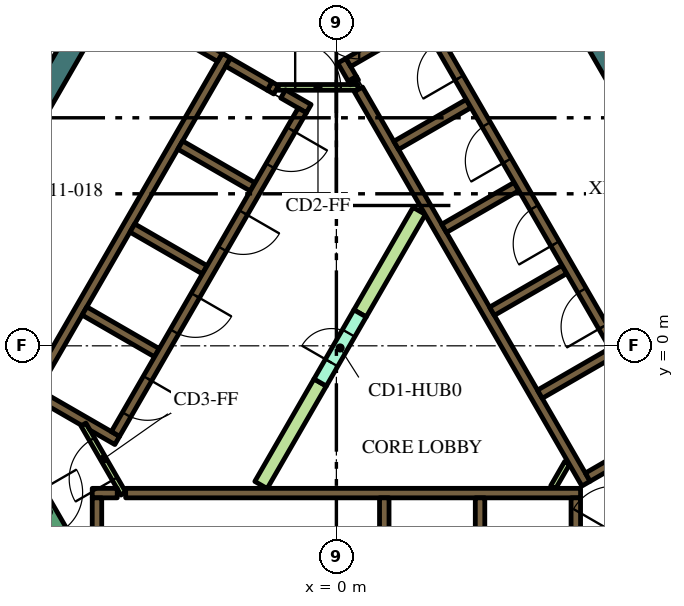
"""IFC4 building model, lengths in metres.
Left out: names, types, materials, properties, quantities, classifications, styles, units other than length and angle.
Written with IfcOpenShell. Run it as: python <this file> out.ifc"""

import sys

from ifc_helpers import new_model, si_unit, direction, frame, frame_2d, origin, place, context, subcontext, project, spatial, polyline, rectangle, outline, extrude, element, fill, save


model = new_model("IFC4")
c1 = context("Model", 3, precision=1e-05, world=origin(), true_north=direction((0.0, 1.0)))
c2 = subcontext(c1, "Body", "Model", "MODEL_VIEW")
j1 = project(units=[si_unit("LENGTHUNIT", "METRE"), si_unit("PLANEANGLEUNIT", "RADIAN")], contexts=[c1])
p1 = place(None, origin())
s1 = spatial("IfcSite", under=j1, at=p1, CompositionType="ELEMENT")
p2 = place(p1, origin())
s2 = spatial("IfcBuilding", under=s1, at=p2, CompositionType="ELEMENT")
p3 = place(p2, frame((0.0, 0.0, 267.0)))
s3 = spatial("IfcBuildingStorey", under=s2, at=p3, CompositionType="ELEMENT", Elevation=267.0)
p4 = place(p3, frame((5.928, 9.633, 0.0), z_axis=(0.0, 0.0, 1.0), x_axis=(0.499983823482, -0.8660347431, 0.0)))
e1 = element("IfcWall", 1, at=p4, inside=s3, PredefinedType="SOLIDWALL", context=c2, shape_type="SweptSolid", body=[
    extrude(rectangle(XDim=4.528, YDim=0.6, at=frame_2d((2.264, 0.0))), origin(), (0.0, 0.0, 1.0), 4.2),
])
p5 = place(p3, frame((-4.652, 11.842, 0.0), z_axis=(0.0, 0.0, 1.0), x_axis=(-0.500003640647, -0.866023301845, 0.0)))
e2 = element("IfcWall", 2, at=p5, inside=s3, PredefinedType="SOLIDWALL", context=c2, shape_type="SweptSolid", body=[
    extrude(rectangle(XDim=15.858, YDim=0.6, at=frame_2d((7.929, 0.0))), origin(), (0.0, 0.0, 1.0), 4.2),
])
p6 = place(p3, frame((-5.545, -3.875, 0.0), z_axis=(0.0, 0.0, 1.0), x_axis=(1.0, 0.0, 0.0)))
e3 = element("IfcWall", 3, at=p6, inside=s3, PredefinedType="SOLIDWALL", context=c2, shape_type="SweptSolid", body=[
    extrude(rectangle(XDim=11.97, YDim=0.25, at=frame_2d((5.985, 0.0))), origin(), (0.0, 0.0, 1.0), 4.2),
])
p7 = place(p3, frame((-6.425, -3.875, 0.0), z_axis=(0.0, 0.0, 1.0), x_axis=(1.0, 0.0, 0.0)))
e4 = element("IfcWall", 4, at=p7, inside=s3, PredefinedType="SOLIDWALL", context=c2, shape_type="SweptSolid", body=[
    extrude(rectangle(XDim=0.658, YDim=0.25, at=frame_2d((0.329, 0.0))), origin(), (0.0, 0.0, 1.0), 4.2),
])
p8 = place(p3, frame((6.3, -7.24, 0.0), z_axis=(0.0, 0.0, 1.0), x_axis=(0.0, 1.0, 0.0)))
e5 = element("IfcWall", 5, at=p8, inside=s3, PredefinedType="SOLIDWALL", context=c2, shape_type="SweptSolid", body=[
    extrude(rectangle(XDim=3.24, YDim=0.25, at=frame_2d((1.62, 0.0))), origin(), (0.0, 0.0, 1.0), 4.2),
])
for number, where, z_axis, x_axis in (
    (6, (3.78, -4.0, 0.0), (0.0, 0.0, 1.0), (0.0, -1.0, 0.0)),
    (7, (1.26, -4.0, 0.0), (0.0, 0.0, 1.0), (0.0, -1.0, 0.0)),
):
    element("IfcWall", number, at=place(p3, frame(where, z_axis=z_axis, x_axis=x_axis)), inside=s3, PredefinedType="SOLIDWALL", context=c2, shape_type="SweptSolid", body=[
        extrude(rectangle(XDim=2.2, YDim=0.25, at=frame_2d((1.1, 0.0))), origin(), (0.0, 0.0, 1.0), 4.2),
    ])
p9 = place(p3, frame((-6.3, -7.125, 0.0), z_axis=(0.0, 0.0, 1.0), x_axis=(0.0, 1.0, 0.0)))
e8 = element("IfcWall", 8, at=p9, inside=s3, PredefinedType="SOLIDWALL", context=c2, shape_type="SweptSolid", body=[
    extrude(rectangle(XDim=3.125, YDim=0.25, at=frame_2d((1.562, 0.0))), origin(), (0.0, 0.0, 1.0), 4.2),
])
p10 = place(p3, frame((0.473, 6.93, 0.0), z_axis=(0.0, 0.0, 1.0), x_axis=(-0.49972245349, 0.866185586049, 0.0)))
e9 = element("IfcWall", 9, at=p10, inside=s3, PredefinedType="SOLIDWALL", context=c2, shape_type="SweptSolid", body=[
    extrude(rectangle(XDim=0.11, YDim=0.25, at=frame_2d((0.055, 0.0))), origin(), (0.0, 0.0, 1.0), 4.2),
])
p11 = place(p3, frame((6.568, -3.627, 0.0), z_axis=(0.0, 0.0, 1.0), x_axis=(-0.499999455981, 0.866025717874, 0.0)))
e10 = element("IfcWall", 10, at=p11, inside=s3, PredefinedType="SOLIDWALL", context=c2, shape_type="SweptSolid", body=[
    extrude(rectangle(XDim=11.978, YDim=0.25, at=frame_2d((5.989, 0.0))), origin(), (0.0, 0.0, 1.0), 4.2),
])
p12 = place(p3, frame((0.417, 7.027, 0.0), z_axis=(0.0, 0.0, 1.0), x_axis=(-0.500210807569, 0.865903659763, 0.0)))
e11 = element("IfcWall", 11, at=p12, inside=s3, PredefinedType="SOLIDWALL", context=c2, shape_type="SweptSolid", body=[
    extrude(rectangle(XDim=0.548, YDim=0.25, at=frame_2d((0.274, 0.0))), origin(), (0.0, 0.0, 1.0), 4.2),
])
p13 = place(p3, frame((3.647, 9.38, 0.0), z_axis=(0.0, 0.0, 1.0), x_axis=(-0.866025015791, -0.500000672024, 0.0)))
e12 = element("IfcWall", 12, at=p13, inside=s3, PredefinedType="SOLIDWALL", context=c2, shape_type="SweptSolid", body=[
    extrude(rectangle(XDim=3.849, YDim=0.25, at=frame_2d((1.924, 0.0))), origin(), (0.0, 0.0, 1.0), 4.2),
])
p14 = place(p3, frame((1.574, 5.274, 0.0), z_axis=(0.0, 0.0, 1.0), x_axis=(0.866028486751, 0.499994660107, 0.0)))
e13 = element("IfcWall", 13, at=p14, inside=s3, PredefinedType="SOLIDWALL", context=c2, shape_type="SweptSolid", body=[
    extrude(rectangle(XDim=2.2, YDim=0.25, at=frame_2d((1.1, 0.0))), origin(), (0.0, 0.0, 1.0), 4.2),
])
for number, where, z_axis, x_axis in (
    (14, (2.834, 3.091, 0.0), (0.0, 0.0, 1.0), (0.866, 0.5, 0.0)),
    (15, (4.094, 0.909, 0.0), (0.0, 0.0, 1.0), (0.866, 0.5, 0.0)),
    (16, (5.354, -1.274, 0.0), (0.0, 0.0, 1.0), (0.866, 0.5, 0.0)),
):
    element("IfcWall", number, at=place(p3, frame(where, z_axis=z_axis, x_axis=x_axis)), inside=s3, PredefinedType="SOLIDWALL", context=c2, shape_type="SweptSolid", body=[
        extrude(rectangle(XDim=2.2, YDim=0.25, at=frame_2d((1.1, 0.0))), origin(), (0.0, 0.0, 1.0), 4.2),
    ])
p15 = place(p3, frame((6.614, -3.456, 0.0), z_axis=(0.0, 0.0, 1.0), x_axis=(0.866032512851, 0.499987686533, 0.0)))
e17 = element("IfcWall", 17, at=p15, inside=s3, PredefinedType="SOLIDWALL", context=c2, shape_type="SweptSolid", body=[
    extrude(rectangle(XDim=2.975, YDim=0.25, at=frame_2d((1.487, 0.0))), origin(), (0.0, 0.0, 1.0), 4.2),
])
p16 = place(p3, frame((-8.06, -1.311, 0.0), z_axis=(0.0, 0.0, 1.0), x_axis=(0.50000273126, 0.866023826885, 0.0)))
e18 = element("IfcWall", 18, at=p16, inside=s3, PredefinedType="SOLIDWALL", context=c2, shape_type="SweptSolid", body=[
    extrude(rectangle(XDim=10.33, YDim=0.25, at=frame_2d((5.165, 0.0))), origin(), (0.0, 0.0, 1.0), 4.2),
])
p17 = place(p3, frame((-1.758, 6.835, 0.0), z_axis=(0.0, 0.0, 1.0), x_axis=(0.865982457891, -0.500074377092, 0.0)))
e19 = element("IfcWall", 19, at=p17, inside=s3, PredefinedType="SOLIDWALL", context=c2, shape_type="SweptSolid", body=[
    extrude(rectangle(XDim=0.2, YDim=0.25, at=frame_2d((0.1, 0.0))), origin(), (0.0, 0.0, 1.0), 4.2),
])
p18 = place(p3, frame((-1.76, 6.836, 0.0), z_axis=(0.0, 0.0, 1.0), x_axis=(-0.865952863304, 0.500125622755, 0.0)))
e20 = element("IfcWall", 20, at=p18, inside=s3, PredefinedType="SOLIDWALL", context=c2, shape_type="SweptSolid", body=[
    extrude(rectangle(XDim=1.258, YDim=0.25, at=frame_2d((0.629, 0.0))), origin(), (0.0, 0.0, 1.0), 4.2),
])
p19 = place(p3, frame((-0.728, 6.24, 0.0), z_axis=(0.0, 0.0, 1.0), x_axis=(-0.865955664968, 0.500120771724, 0.0)))
e21 = element("IfcWall", 21, at=p19, inside=s3, PredefinedType="SOLIDWALL", context=c2, shape_type="SweptSolid", body=[
    extrude(rectangle(XDim=0.778, YDim=0.25, at=frame_2d((0.389, 0.0))), origin(), (0.0, 0.0, 1.0), 4.2),
])
for number, where, z_axis, x_axis in (
    (22, (-2.204, 4.182, 0.0), (0.0, 0.0, 1.0), (-0.866, 0.5, 0.0)),
    (23, (-5.369, 3.1, 0.0), (0.0, 0.0, 1.0), (0.866, -0.5, 0.0)),
    (24, (-4.724, -0.182, 0.0), (0.0, 0.0, 1.0), (-0.866, 0.5, 0.0)),
):
    element("IfcWall", number, at=place(p3, frame(where, z_axis=z_axis, x_axis=x_axis)), inside=s3, PredefinedType="SOLIDWALL", context=c2, shape_type="SweptSolid", body=[
        extrude(rectangle(XDim=2.2, YDim=0.25, at=frame_2d((1.1, 0.0))), origin(), (0.0, 0.0, 1.0), 4.2),
    ])
p20 = place(p3, origin())
e25 = element("IfcWall", 25, at=p20, inside=s3, PredefinedType="SOLIDWALL", context=c2, shape_type="SweptSolid", body=[
    extrude(outline(polyline([(-5.922, -2.257), (-5.922, -2.257), (-5.705, -2.382), (-5.83, -2.598), (-6.483, -2.221), (-6.591, -2.033), (-6.591, -2.033), (-6.7, -2.096), (-7.952, -1.373), (-7.827, -1.156), (-5.922, -2.257)])), origin(), (0.0, 0.0, 1.0), 4.2),
])
p21 = place(p3, frame((-3.066, 7.59, 0.0), z_axis=(0.0, 0.0, 1.0), x_axis=(-0.866081358704, 0.49990307071, 0.0)))
e26 = element("IfcWall", 26, at=p21, inside=s3, PredefinedType="SOLIDWALL", context=c2, shape_type="SweptSolid", body=[
    extrude(rectangle(XDim=0.858, YDim=0.25, at=frame_2d((0.429, 0.0))), origin(), (0.0, 0.0, 1.0), 4.2),
])
p22 = place(p3, frame((5.705, -3.718, 0.0), z_axis=(0.0, 0.0, 1.0), x_axis=(0.499962090823, 0.866047289552, 0.0)))
e27 = element("IfcWall", 27, at=p22, inside=s3, PredefinedType="PARTITIONING", context=c2, shape_type="SweptSolid", body=[
    extrude(rectangle(XDim=0.735, YDim=0.15, at=frame_2d((0.367, 0.0))), origin(), (0.0, 0.0, 1.0), 3.55),
])
e28 = element("IfcWall", 28, at=p20, inside=s3, PredefinedType="PARTITIONING", context=c2, shape_type="SweptSolid", body=[
    extrude(outline(polyline([(2.017, 3.643), (2.342, 3.456), (0.785, 0.76), (0.46, 0.947), (2.017, 3.643)])), origin(), (0.0, 0.0, 1.0), 3.55),
])
e29 = element("IfcWall", 29, at=p20, inside=s3, PredefinedType="PARTITIONING", context=c2, shape_type="SweptSolid", body=[
    extrude(outline(polyline([(-0.59, -0.872), (-0.265, -1.059), (-1.822, -3.756), (-2.147, -3.568), (-0.59, -0.872)])), origin(), (0.0, 0.0, 1.0), 3.55),
])
p23 = place(p3, frame((8.565, -2.185, 0.0), z_axis=(0.0, 0.0, 1.0), x_axis=(-0.499997954832, 0.866026584559, 0.0)))
e30 = element("IfcWall", 30, at=p23, inside=s3, PredefinedType="SOLIDWALL", context=c2, shape_type="SweptSolid", body=[
    extrude(rectangle(XDim=12.35, YDim=0.25, at=frame_2d((6.175, 0.0))), origin(), (0.0, 0.0, 1.0), 4.2),
])
p24 = place(p23, frame((0.685, 0.0, 0.0)))
e31 = element("IfcOpeningElement", 31, at=p24, cuts=e30, PredefinedType="OPENING", context=c2, shape_type="SweptSolid", body=[
    extrude(rectangle(XDim=0.9, YDim=2.1, at=frame_2d((0.45, 1.05))), frame((0.0, 0.135, 0.0), z_axis=(0.0, -1.0, 0.0), x_axis=(1.0, 0.0, 0.0)), (0.0, 0.0, 1.0), 0.27),
])
p25 = place(p23, frame((3.105, 0.0, 0.0)))
e32 = element("IfcOpeningElement", 32, at=p25, cuts=e30, PredefinedType="OPENING", context=c2, shape_type="SweptSolid", body=[
    extrude(rectangle(XDim=1.1, YDim=2.1, at=frame_2d((0.55, 1.05))), frame((0.0, 0.135, 0.0), z_axis=(0.0, -1.0, 0.0), x_axis=(1.0, 0.0, 0.0)), (0.0, 0.0, 1.0), 0.27),
])
p26 = place(p23, frame((5.625, 0.0, 0.0)))
e33 = element("IfcOpeningElement", 33, at=p26, cuts=e30, PredefinedType="OPENING", context=c2, shape_type="SweptSolid", body=[
    extrude(rectangle(XDim=1.1, YDim=2.1, at=frame_2d((0.55, 1.05))), frame((0.0, 0.135, 0.0), z_axis=(0.0, -1.0, 0.0), x_axis=(1.0, 0.0, 0.0)), (0.0, 0.0, 1.0), 0.27),
])
p27 = place(p23, frame((8.145, 0.0, 0.0)))
e34 = element("IfcOpeningElement", 34, at=p27, cuts=e30, PredefinedType="OPENING", context=c2, shape_type="SweptSolid", body=[
    extrude(rectangle(XDim=1.1, YDim=2.1, at=frame_2d((0.55, 1.05))), frame((0.0, 0.135, 0.0), z_axis=(0.0, -1.0, 0.0), x_axis=(1.0, 0.0, 0.0)), (0.0, 0.0, 1.0), 0.27),
])
p28 = place(p23, frame((10.665, 0.0, 0.0)))
e35 = element("IfcOpeningElement", 35, at=p28, cuts=e30, PredefinedType="OPENING", context=c2, shape_type="SweptSolid", body=[
    extrude(rectangle(XDim=1.1, YDim=2.1, at=frame_2d((0.55, 1.05))), frame((0.0, 0.135, 0.0), z_axis=(0.0, -1.0, 0.0), x_axis=(1.0, 0.0, 0.0)), (0.0, 0.0, 1.0), 0.27),
])
p29 = place(p3, frame((-0.898, 6.194, 0.0), z_axis=(0.0, 0.0, 1.0), x_axis=(-0.499996202215, -0.866027596426, 0.0)))
e36 = element("IfcWall", 36, at=p29, inside=s3, PredefinedType="SOLIDWALL", context=c2, shape_type="SweptSolid", body=[
    extrude(rectangle(XDim=9.83, YDim=0.25, at=frame_2d((4.915, 0.0))), origin(), (0.0, 0.0, 1.0), 4.2),
])
p30 = place(p29, frame((0.585, 0.0, 0.0)))
e37 = element("IfcOpeningElement", 37, at=p30, cuts=e36, PredefinedType="OPENING", context=c2, shape_type="SweptSolid", body=[
    extrude(rectangle(XDim=1.1, YDim=2.1, at=frame_2d((0.55, 1.05))), frame((0.0, 0.135, 0.0), z_axis=(0.0, -1.0, 0.0), x_axis=(1.0, 0.0, 0.0)), (0.0, 0.0, 1.0), 0.27),
])
p31 = place(p29, frame((3.105, 0.0, 0.0)))
e38 = element("IfcOpeningElement", 38, at=p31, cuts=e36, PredefinedType="OPENING", context=c2, shape_type="SweptSolid", body=[
    extrude(rectangle(XDim=1.1, YDim=2.1, at=frame_2d((0.55, 1.05))), frame((0.0, 0.135, 0.0), z_axis=(0.0, -1.0, 0.0), x_axis=(1.0, 0.0, 0.0)), (0.0, 0.0, 1.0), 0.27),
])
p32 = place(p29, frame((5.625, 0.0, 0.0)))
e39 = element("IfcOpeningElement", 39, at=p32, cuts=e36, PredefinedType="OPENING", context=c2, shape_type="SweptSolid", body=[
    extrude(rectangle(XDim=1.1, YDim=2.1, at=frame_2d((0.55, 1.05))), frame((0.0, 0.135, 0.0), z_axis=(0.0, -1.0, 0.0), x_axis=(1.0, 0.0, 0.0)), (0.0, 0.0, 1.0), 0.27),
])
p33 = place(p29, frame((8.145, 0.0, 0.0)))
e40 = element("IfcOpeningElement", 40, at=p33, cuts=e36, PredefinedType="OPENING", context=c2, shape_type="SweptSolid", body=[
    extrude(rectangle(XDim=1.1, YDim=2.1, at=frame_2d((0.55, 1.05))), frame((0.0, 0.135, 0.0), z_axis=(0.0, -1.0, 0.0), x_axis=(1.0, 0.0, 0.0)), (0.0, 0.0, 1.0), 0.27),
])
p34 = place(p3, frame((7.053, -5.284, 0.0), z_axis=(0.0, 0.0, 1.0), x_axis=(0.500078061341, 0.865980330357, 0.0)))
e41 = element("IfcWall", 41, at=p34, inside=s3, PredefinedType="SOLIDWALL", context=c2, shape_type="SweptSolid", body=[
    extrude(rectangle(XDim=2.1, YDim=0.4, at=frame_2d((1.05, 0.0))), origin(), (0.0, 0.0, 1.0), 4.2),
])
p35 = place(p34, frame((0.45, 0.0, 0.0)))
e42 = element("IfcOpeningElement", 42, at=p35, cuts=e41, PredefinedType="OPENING", context=c2, shape_type="SweptSolid", body=[
    extrude(rectangle(XDim=1.2, YDim=2.1, at=frame_2d((0.6, 1.05))), frame((0.0, 0.21, 0.0), z_axis=(0.0, -1.0, 0.0), x_axis=(1.0, 0.0, 0.0)), (0.0, 0.0, 1.0), 0.42),
])
p36 = place(p3, frame((-8.103, -3.466, 0.0), z_axis=(0.0, 0.0, 1.0), x_axis=(0.500078061341, -0.865980330357, 0.0)))
e43 = element("IfcWall", 43, at=p36, inside=s3, PredefinedType="SOLIDWALL", context=c2, shape_type="SweptSolid", body=[
    extrude(rectangle(XDim=2.1, YDim=0.4, at=frame_2d((1.05, 0.0))), origin(), (0.0, 0.0, 1.0), 4.2),
])
p37 = place(p36, frame((0.45, 0.0, 0.0)))
e44 = element("IfcOpeningElement", 44, at=p37, cuts=e43, PredefinedType="OPENING", context=c2, shape_type="SweptSolid", body=[
    extrude(rectangle(XDim=1.2, YDim=2.1, at=frame_2d((0.6, 1.05))), frame((0.0, 0.21, 0.0), z_axis=(0.0, -1.0, 0.0), x_axis=(1.0, 0.0, 0.0)), (0.0, 0.0, 1.0), 0.42),
])
p38 = place(p3, frame((-0.427, -0.966, 0.0), z_axis=(0.0, 0.0, 1.0), x_axis=(0.49994051562, 0.866059744384, 0.0)))
e45 = element("IfcWall", 45, at=p38, inside=s3, PredefinedType="PARTITIONING", context=c2, shape_type="SweptSolid", body=[
    extrude(rectangle(XDim=2.1, YDim=0.375, at=frame_2d((1.05, 0.0))), origin(), (0.0, 0.0, 1.0), 3.55),
])
p39 = place(p38, frame((0.6, 0.0, 0.0)))
e46 = element("IfcOpeningElement", 46, at=p39, cuts=e45, PredefinedType="OPENING", context=c2, shape_type="SweptSolid", body=[
    extrude(rectangle(XDim=0.9, YDim=2.1, at=frame_2d((0.45, 1.05))), frame((0.0, 0.198, 0.0), z_axis=(0.0, -1.0, 0.0), x_axis=(1.0, 0.0, 0.0)), (0.0, 0.0, 1.0), 0.395),
])
p40 = place(p3, frame((-1.534, 6.8, 0.0), z_axis=(0.0, 0.0, 1.0), x_axis=(1.0, 0.0, 0.0)))
e47 = element("IfcWall", 47, at=p40, inside=s3, PredefinedType="PARTITIONING", context=c2, shape_type="SweptSolid", body=[
    extrude(rectangle(XDim=2.1, YDim=0.15, at=frame_2d((1.05, 0.0))), origin(), (0.0, 0.0, 1.0), 3.55),
])
p41 = place(p40, frame((0.45, 0.0, 0.0)))
e48 = element("IfcOpeningElement", 48, at=p41, cuts=e47, PredefinedType="OPENING", context=c2, shape_type="SweptSolid", body=[
    extrude(rectangle(XDim=1.2, YDim=2.1, at=frame_2d((0.6, 1.05))), frame((0.0, 0.085, 0.0), z_axis=(0.0, -1.0, 0.0), x_axis=(1.0, 0.0, 0.0)), (0.0, 0.0, 1.0), 0.17),
])
p42 = place(p3, frame((-5.606, -3.89, 0.0), z_axis=(0.0, 0.0, 1.0), x_axis=(-0.500027713859, 0.866009402589, 0.0)))
e49 = element("IfcWall", 49, at=p42, inside=s3, PredefinedType="PARTITIONING", context=c2, shape_type="SweptSolid", body=[
    extrude(rectangle(XDim=2.1, YDim=0.15, at=frame_2d((1.05, 0.0))), origin(), (0.0, 0.0, 1.0), 3.55),
])
p43 = place(p42, frame((0.45, 0.0, 0.0)))
e50 = element("IfcOpeningElement", 50, at=p43, cuts=e49, PredefinedType="OPENING", context=c2, shape_type="SweptSolid", body=[
    extrude(rectangle(XDim=1.2, YDim=2.1, at=frame_2d((0.6, 1.05))), frame((0.0, 0.085, 0.0), z_axis=(0.0, -1.0, 0.0), x_axis=(1.0, 0.0, 0.0)), (0.0, 0.0, 1.0), 0.17),
])
p44 = place(p3, frame((-7.436, 11.221, 0.0), z_axis=(0.0, 0.0, 1.0), x_axis=(-0.49999894854, -0.866026010844, 0.0)))
e51 = element("IfcWall", 51, at=p44, inside=s3, PredefinedType="PARTITIONING", context=c2, shape_type="SweptSolid", body=[
    extrude(rectangle(XDim=12.0, YDim=0.2, at=frame_2d((6.0, 0.0))), origin(), (0.0, 0.0, 1.0), 3.55),
])
p45 = place(p44, frame((5.5, 0.0, 0.0)))
e52 = element("IfcOpeningElement", 52, at=p45, cuts=e51, PredefinedType="OPENING", context=c2, shape_type="SweptSolid", body=[
    extrude(rectangle(XDim=1.0, YDim=2.1, at=frame_2d((0.5, 1.05))), frame((0.0, 0.11, 0.0), z_axis=(0.0, -1.0, 0.0), x_axis=(1.0, 0.0, 0.0)), (0.0, 0.0, 1.0), 0.22),
])
p46 = place(p25, origin())
e53 = element("IfcDoor", 53, at=p46, inside=s3, OperationType="DOUBLE_DOOR_SLIDING", PredefinedType="DOOR", context=c2, shape_type="SweptSolid", body=[
    extrude(rectangle(XDim=1.1, YDim=2.1, at=frame_2d((0.55, 1.05))), frame((0.0, 0.025, 0.0), z_axis=(0.0, -1.0, 0.0), x_axis=(1.0, 0.0, 0.0)), (0.0, 0.0, 1.0), 0.05),
])
fill(e32, e53)
p47 = place(p26, origin())
e54 = element("IfcDoor", 54, at=p47, inside=s3, OperationType="DOUBLE_DOOR_SLIDING", PredefinedType="DOOR", context=c2, shape_type="SweptSolid", body=[
    extrude(rectangle(XDim=1.1, YDim=2.1, at=frame_2d((0.55, 1.05))), frame((0.0, 0.025, 0.0), z_axis=(0.0, -1.0, 0.0), x_axis=(1.0, 0.0, 0.0)), (0.0, 0.0, 1.0), 0.05),
])
fill(e33, e54)
p48 = place(p27, origin())
e55 = element("IfcDoor", 55, at=p48, inside=s3, OperationType="DOUBLE_DOOR_SLIDING", PredefinedType="DOOR", context=c2, shape_type="SweptSolid", body=[
    extrude(rectangle(XDim=1.1, YDim=2.1, at=frame_2d((0.55, 1.05))), frame((0.0, 0.025, 0.0), z_axis=(0.0, -1.0, 0.0), x_axis=(1.0, 0.0, 0.0)), (0.0, 0.0, 1.0), 0.05),
])
fill(e34, e55)
p49 = place(p28, origin())
e56 = element("IfcDoor", 56, at=p49, inside=s3, OperationType="DOUBLE_DOOR_SLIDING", PredefinedType="DOOR", context=c2, shape_type="SweptSolid", body=[
    extrude(rectangle(XDim=1.1, YDim=2.1, at=frame_2d((0.55, 1.05))), frame((0.0, 0.025, 0.0), z_axis=(0.0, -1.0, 0.0), x_axis=(1.0, 0.0, 0.0)), (0.0, 0.0, 1.0), 0.05),
])
fill(e35, e56)
p50 = place(p30, origin())
e57 = element("IfcDoor", 57, at=p50, inside=s3, OperationType="DOUBLE_DOOR_SLIDING", PredefinedType="DOOR", context=c2, shape_type="SweptSolid", body=[
    extrude(rectangle(XDim=1.1, YDim=2.1, at=frame_2d((0.55, 1.05))), frame((0.0, 0.025, 0.0), z_axis=(0.0, -1.0, 0.0), x_axis=(1.0, 0.0, 0.0)), (0.0, 0.0, 1.0), 0.05),
])
fill(e37, e57)
p51 = place(p31, origin())
e58 = element("IfcDoor", 58, at=p51, inside=s3, OperationType="DOUBLE_DOOR_SLIDING", PredefinedType="DOOR", context=c2, shape_type="SweptSolid", body=[
    extrude(rectangle(XDim=1.1, YDim=2.1, at=frame_2d((0.55, 1.05))), frame((0.0, 0.025, 0.0), z_axis=(0.0, -1.0, 0.0), x_axis=(1.0, 0.0, 0.0)), (0.0, 0.0, 1.0), 0.05),
])
fill(e38, e58)
p52 = place(p32, origin())
e59 = element("IfcDoor", 59, at=p52, inside=s3, OperationType="DOUBLE_DOOR_SLIDING", PredefinedType="DOOR", context=c2, shape_type="SweptSolid", body=[
    extrude(rectangle(XDim=1.1, YDim=2.1, at=frame_2d((0.55, 1.05))), frame((0.0, 0.025, 0.0), z_axis=(0.0, -1.0, 0.0), x_axis=(1.0, 0.0, 0.0)), (0.0, 0.0, 1.0), 0.05),
])
fill(e39, e59)
p53 = place(p33, origin())
e60 = element("IfcDoor", 60, at=p53, inside=s3, OperationType="DOUBLE_DOOR_SLIDING", PredefinedType="DOOR", context=c2, shape_type="SweptSolid", body=[
    extrude(rectangle(XDim=1.1, YDim=2.1, at=frame_2d((0.55, 1.05))), frame((0.0, 0.025, 0.0), z_axis=(0.0, -1.0, 0.0), x_axis=(1.0, 0.0, 0.0)), (0.0, 0.0, 1.0), 0.05),
])
fill(e40, e60)
p54 = place(p37, origin())
e61 = element("IfcDoor", 61, at=p54, inside=s3, OperationType="SINGLE_SWING_LEFT", PredefinedType="DOOR", context=c2, shape_type="SweptSolid", body=[
    extrude(rectangle(XDim=1.2, YDim=2.1, at=frame_2d((0.6, 1.05))), frame((0.0, 0.025, 0.0), z_axis=(0.0, -1.0, 0.0), x_axis=(1.0, 0.0, 0.0)), (0.0, 0.0, 1.0), 0.05),
])
fill(e44, e61)
p55 = place(p39, origin())
e62 = element("IfcDoor", 62, at=p55, inside=s3, OperationType="SINGLE_SWING_LEFT", PredefinedType="DOOR", context=c2, shape_type="SweptSolid", body=[
    extrude(rectangle(XDim=0.9, YDim=2.1, at=frame_2d((0.45, 1.05))), frame((0.0, 0.025, 0.0), z_axis=(0.0, -1.0, 0.0), x_axis=(1.0, 0.0, 0.0)), (0.0, 0.0, 1.0), 0.05),
])
fill(e46, e62)
p56 = place(p41, origin())
e63 = element("IfcDoor", 63, at=p56, inside=s3, OperationType="SINGLE_SWING_LEFT", PredefinedType="DOOR", context=c2, shape_type="SweptSolid", body=[
    extrude(rectangle(XDim=1.2, YDim=2.1, at=frame_2d((0.6, 1.05))), frame((0.0, 0.025, 0.0), z_axis=(0.0, -1.0, 0.0), x_axis=(1.0, 0.0, 0.0)), (0.0, 0.0, 1.0), 0.05),
])
fill(e48, e63)
p57 = place(p43, origin())
e64 = element("IfcDoor", 64, at=p57, inside=s3, OperationType="SINGLE_SWING_LEFT", PredefinedType="DOOR", context=c2, shape_type="SweptSolid", body=[
    extrude(rectangle(XDim=1.2, YDim=2.1, at=frame_2d((0.6, 1.05))), frame((0.0, 0.025, 0.0), z_axis=(0.0, -1.0, 0.0), x_axis=(1.0, 0.0, 0.0)), (0.0, 0.0, 1.0), 0.05),
])
fill(e50, e64)
save(model, sys.argv[1])
